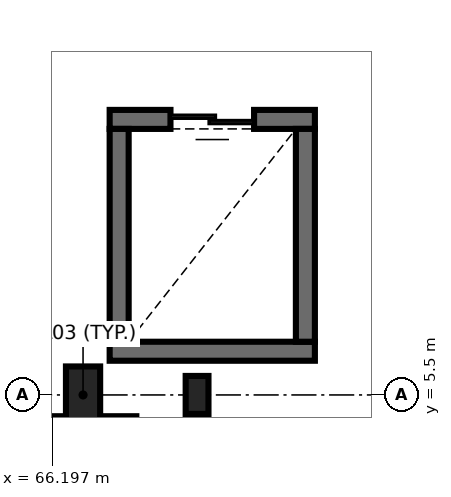
"""IFC4 building model, lengths in metres.
Left out: names, types, materials, properties, quantities, classifications, styles, units other than length and angle.
Written with IfcOpenShell. Run it as: python <this file> out.ifc"""

import sys

from ifc_helpers import new_model, si_unit, direction, frame, frame_2d, origin, origin_2d, place, context, subcontext, project, spatial, rectangle, i_section, extrude, element, fill, save


model = new_model("IFC4")
c1 = context("Model", 3, precision=1e-05, world=origin(), true_north=direction((0.0, 1.0)))
c2 = subcontext(c1, "Body", "Model", "MODEL_VIEW")
j1 = project(units=[si_unit("LENGTHUNIT", "METRE"), si_unit("PLANEANGLEUNIT", "RADIAN")], contexts=[c1])
p1 = place(None, origin())
s1 = spatial("IfcSite", under=j1, at=p1, CompositionType="ELEMENT")
p2 = place(p1, origin())
s2 = spatial("IfcBuilding", under=s1, at=p2, CompositionType="ELEMENT")
p3 = place(p2, frame((0.0, 0.0, 13.8)))
s3 = spatial("IfcBuildingStorey", under=s2, at=p3, CompositionType="ELEMENT", Elevation=13.8)
p4 = place(p3, frame((66.6, 5.5, 0.0), z_axis=(0.0, 0.0, 1.0), x_axis=(1.0, 0.0, 0.0)))
e1 = element("IfcColumn", 1, at=p4, inside=s3, PredefinedType="PILASTER", context=c2, shape_type="SweptSolid", body=[
    extrude(rectangle(XDim=0.45, YDim=0.75, at=origin_2d()), origin(), (0.0, 0.0, 1.0), 7.521),
])
p5 = place(p3, frame((68.1, 5.5, 0.0), z_axis=(0.0, 0.0, 1.0), x_axis=(1.0, 0.0, 0.0)))
e2 = element("IfcColumn", 2, at=p5, inside=s3, PredefinedType="COLUMN", context=c2, shape_type="SweptSolid", body=[
    extrude(i_section(OverallWidth=0.3, OverallDepth=0.5, WebThickness=0.014, FlangeThickness=0.028, FilletRadius=0.027, at=origin_2d()), origin(), (0.0, 0.0, 1.0), 7.938),
])
p6 = place(p3, frame((66.95, 6.075, 0.0), z_axis=(0.0, 0.0, 1.0), x_axis=(1.0, 0.0, 0.0)))
e3 = element("IfcWall", 3, at=p6, inside=s3, PredefinedType="SHEAR", context=c2, shape_type="SweptSolid", body=[
    extrude(rectangle(XDim=2.7, YDim=0.25, at=frame_2d((1.35, 0.0))), origin(), (0.0, 0.0, 1.0), 4.5),
])
p7 = place(p3, frame((69.65, 9.125, 0.0), z_axis=(0.0, 0.0, 1.0), x_axis=(-1.0, 0.0, 0.0)))
e4 = element("IfcWall", 4, at=p7, inside=s3, PredefinedType="SHEAR", context=c2, shape_type="SweptSolid", body=[
    extrude(rectangle(XDim=2.7, YDim=0.25, at=frame_2d((1.35, 0.0))), origin(), (0.0, 0.0, 1.0), 4.5),
])
p8 = place(p7, frame((0.8, 0.0, 0.0)))
e5 = element("IfcOpeningElement", 5, at=p8, cuts=e4, PredefinedType="OPENING", context=c2, shape_type="SweptSolid", body=[
    extrude(rectangle(XDim=1.1, YDim=2.15, at=frame_2d((0.55, 1.075))), frame((0.0, 0.135, 0.0), z_axis=(0.0, -1.0, 0.0), x_axis=(1.0, 0.0, 0.0)), (0.0, 0.0, 1.0), 0.27),
])
for number, where, z_axis, x_axis in (
    (6, (67.075, 9.0, 0.0), (0.0, 0.0, 1.0), (0.0, -1.0, 0.0)),
    (7, (69.525, 6.2, 0.0), (0.0, 0.0, 1.0), (0.0, 1.0, 0.0)),
):
    element("IfcWall", number, at=place(p3, frame(where, z_axis=z_axis, x_axis=x_axis)), inside=s3, PredefinedType="SHEAR", context=c2, shape_type="SweptSolid", body=[
        extrude(rectangle(XDim=2.8, YDim=0.25, at=frame_2d((1.4, 0.0))), origin(), (0.0, 0.0, 1.0), 4.5),
    ])
p9 = place(p3, frame((55.002, 5.06, 0.0), z_axis=(0.0, 0.0, 1.0), x_axis=(1.0, 0.0, 0.0)))
e8 = element("IfcWall", 8, at=p9, inside=s3, PredefinedType="SHEAR", context=c2, shape_type="SweptSolid", body=[
    extrude(rectangle(XDim=12.299, YDim=0.32, at=frame_2d((6.149, 0.0))), origin(), (0.0, 0.0, 1.0), 4.62),
])
p10 = place(p9, frame((8.358, 0.0, 0.9)))
e9 = element("IfcOpeningElement", 9, at=p10, cuts=e8, PredefinedType="OPENING", context=c2, shape_type="SweptSolid", body=[
    extrude(rectangle(XDim=2.25, YDim=1.95, at=frame_2d((1.125, 0.975))), frame((0.0, 0.17, 0.0), z_axis=(0.0, -1.0, 0.0), x_axis=(1.0, 0.0, 0.0)), (0.0, 0.0, 1.0), 0.34),
])
p11 = place(p8, origin())
e10 = element("IfcDoor", 10, at=p11, inside=s3, OperationType="DOUBLE_DOOR_SLIDING", PredefinedType="DOOR", context=c2, shape_type="SweptSolid", body=[
    extrude(rectangle(XDim=1.1, YDim=2.15, at=frame_2d((0.55, 1.075))), frame((0.0, 0.025, 0.0), z_axis=(0.0, -1.0, 0.0), x_axis=(1.0, 0.0, 0.0)), (0.0, 0.0, 1.0), 0.05),
])
fill(e5, e10)
save(model, sys.argv[1])
